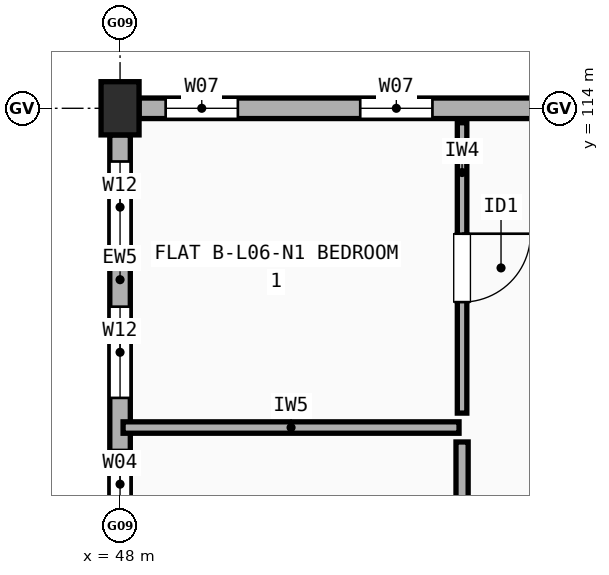
"""IFC4 building model, lengths in metres.
Left out: names, types, materials, properties, quantities, classifications, styles, units other than length and angle.
Written with IfcOpenShell. Run it as: python <this file> out.ifc"""

import sys

from ifc_helpers import new_model, si_unit, direction, frame, frame_2d, origin, origin_2d, place, context, subcontext, project, spatial, rectangle, extrude, element, fill, save


model = new_model("IFC4")
c1 = context("Model", 3, precision=1e-05, world=origin(), true_north=direction((0.0, 1.0)))
c2 = subcontext(c1, "Body", "Model", "MODEL_VIEW")
j1 = project(units=[si_unit("LENGTHUNIT", "METRE"), si_unit("PLANEANGLEUNIT", "RADIAN")], contexts=[c1])
p1 = place(None, origin())
s1 = spatial("IfcSite", under=j1, at=p1, CompositionType="ELEMENT")
p2 = place(p1, origin())
s2 = spatial("IfcBuilding", under=s1, at=p2, CompositionType="ELEMENT")
p3 = place(p2, frame((0.0, 0.0, 20.5)))
s3 = spatial("IfcBuildingStorey", under=s2, at=p3, CompositionType="ELEMENT", Elevation=20.5)
p4 = place(p3, frame((48.0, 114.0, 0.0), z_axis=(0.0, 0.0, 1.0), x_axis=(1.0, 0.0, 0.0)))
e1 = element("IfcColumn", 1, at=p4, inside=s3, PredefinedType="COLUMN", context=c2, shape_type="SweptSolid", body=[
    extrude(rectangle(XDim=0.5, YDim=0.7, at=origin_2d()), origin(), (0.0, 0.0, 1.0), 2.97),
])
p5 = place(p3, frame((53.725, 114.0, 0.0), z_axis=(0.0, 0.0, 1.0), x_axis=(-1.0, 0.0, 0.0)))
e2 = element("IfcWall", 2, at=p5, inside=s3, PredefinedType="STANDARD", context=c2, shape_type="SweptSolid", body=[
    extrude(rectangle(XDim=5.475, YDim=0.27, at=frame_2d((2.738, 0.0))), origin(), (0.0, 0.0, 1.0), 2.452),
])
p6 = place(p5, frame((1.615, 0.0, 0.9)))
e3 = element("IfcOpeningElement", 3, at=p6, cuts=e2, PredefinedType="OPENING", context=c2, shape_type="SweptSolid", body=[
    extrude(rectangle(XDim=0.95, YDim=1.35, at=frame_2d((0.475, 0.675))), frame((0.0, 0.145, 0.0), z_axis=(0.0, -1.0, 0.0), x_axis=(1.0, 0.0, 0.0)), (0.0, 0.0, 1.0), 0.29),
])
p7 = place(p5, frame((4.175, 0.0, 0.9)))
e4 = element("IfcOpeningElement", 4, at=p7, cuts=e2, PredefinedType="OPENING", context=c2, shape_type="SweptSolid", body=[
    extrude(rectangle(XDim=0.95, YDim=1.35, at=frame_2d((0.475, 0.675))), frame((0.0, 0.145, 0.0), z_axis=(0.0, -1.0, 0.0), x_axis=(1.0, 0.0, 0.0)), (0.0, 0.0, 1.0), 0.29),
])
p8 = place(p3, frame((48.0, 113.65, 0.0), z_axis=(0.0, 0.0, 1.0), x_axis=(0.0, -1.0, 0.0)))
e5 = element("IfcWall", 5, at=p8, inside=s3, PredefinedType="STANDARD", context=c2, shape_type="SweptSolid", body=[
    extrude(rectangle(XDim=5.3, YDim=0.27, at=frame_2d((2.65, 0.0))), origin(), (0.0, 0.0, 1.0), 2.452),
])
p9 = place(p8, frame((0.35, 0.0, 0.9)))
e6 = element("IfcOpeningElement", 6, at=p9, cuts=e5, PredefinedType="OPENING", context=c2, shape_type="SweptSolid", body=[
    extrude(rectangle(XDim=1.2, YDim=1.35, at=frame_2d((0.6, 0.675))), frame((0.0, 0.145, 0.0), z_axis=(0.0, -1.0, 0.0), x_axis=(1.0, 0.0, 0.0)), (0.0, 0.0, 1.0), 0.29),
])
p10 = place(p8, frame((2.26, 0.0, 0.9)))
e7 = element("IfcOpeningElement", 7, at=p10, cuts=e5, PredefinedType="OPENING", context=c2, shape_type="SweptSolid", body=[
    extrude(rectangle(XDim=1.2, YDim=1.35, at=frame_2d((0.6, 0.675))), frame((0.0, 0.145, 0.0), z_axis=(0.0, -1.0, 0.0), x_axis=(1.0, 0.0, 0.0)), (0.0, 0.0, 1.0), 0.29),
])
p11 = place(p8, frame((4.145, 0.0, 0.9)))
e8 = element("IfcOpeningElement", 8, at=p11, cuts=e5, PredefinedType="OPENING", context=c2, shape_type="SweptSolid", body=[
    extrude(rectangle(XDim=0.9, YDim=1.3, at=frame_2d((0.45, 0.65))), frame((0.0, 0.145, 0.0), z_axis=(0.0, -1.0, 0.0), x_axis=(1.0, 0.0, 0.0)), (0.0, 0.0, 1.0), 0.29),
])
p12 = place(p3, frame((52.5, 109.99, 0.0), z_axis=(0.0, 0.0, 1.0), x_axis=(0.0, 1.0, 0.0)))
e9 = element("IfcWall", 9, at=p12, inside=s3, PredefinedType="PARTITIONING", context=c2, shape_type="SweptSolid", body=[
    extrude(rectangle(XDim=3.82, YDim=0.125, at=frame_2d((1.91, 0.0))), origin(), (0.0, 0.0, 1.0), 2.97),
])
p13 = place(p12, frame((1.46, 0.0, 0.0)))
e10 = element("IfcOpeningElement", 10, at=p13, cuts=e9, PredefinedType="OPENING", context=c2, shape_type="SweptSolid", body=[
    extrude(rectangle(XDim=0.9, YDim=2.1, at=frame_2d((0.45, 1.05))), frame((0.0, 0.073, 0.0), z_axis=(0.0, -1.0, 0.0), x_axis=(1.0, 0.0, 0.0)), (0.0, 0.0, 1.0), 0.145),
])
p14 = place(p3, frame((52.5, 102.24, 0.0), z_axis=(0.0, 0.0, 1.0), x_axis=(0.0, 1.0, 0.0)))
e11 = element("IfcWall", 11, at=p14, inside=s3, PredefinedType="PLUMBINGWALL", context=c2, shape_type="SweptSolid", body=[
    extrude(rectangle(XDim=7.37, YDim=0.16, at=frame_2d((3.685, 0.0))), origin(), (0.0, 0.0, 1.0), 2.452),
])
p15 = place(p14, frame((3.245, 0.0, 0.0)))
e12 = element("IfcOpeningElement", 12, at=p15, cuts=e11, PredefinedType="OPENING", context=c2, shape_type="SweptSolid", body=[
    extrude(rectangle(XDim=0.88, YDim=2.1, at=frame_2d((0.44, 1.05))), frame((0.0, 0.09, 0.0), z_axis=(0.0, -1.0, 0.0), x_axis=(1.0, 0.0, 0.0)), (0.0, 0.0, 1.0), 0.18),
])
p16 = place(p3, frame((48.04, 109.8, 0.0), z_axis=(0.0, 0.0, 1.0), x_axis=(1.0, 0.0, 0.0)))
e13 = element("IfcWall", 13, at=p16, inside=s3, PredefinedType="PARTITIONING", context=c2, shape_type="SweptSolid", body=[
    extrude(rectangle(XDim=4.42, YDim=0.15, at=frame_2d((2.21, 0.0))), origin(), (0.0, 0.0, 1.0), 2.452),
])
p17 = place(p6, origin())
e14 = element("IfcWindow", 14, at=p17, inside=s3, PartitioningType="SINGLE_PANEL", PredefinedType="WINDOW", context=c2, shape_type="SweptSolid", body=[
    extrude(rectangle(XDim=0.95, YDim=1.35, at=frame_2d((0.475, 0.675))), frame((0.0, 0.03, 0.0), z_axis=(0.0, -1.0, 0.0), x_axis=(1.0, 0.0, 0.0)), (0.0, 0.0, 1.0), 0.06),
])
fill(e3, e14)
p18 = place(p7, origin())
e15 = element("IfcWindow", 15, at=p18, inside=s3, PartitioningType="SINGLE_PANEL", PredefinedType="WINDOW", context=c2, shape_type="SweptSolid", body=[
    extrude(rectangle(XDim=0.95, YDim=1.35, at=frame_2d((0.475, 0.675))), frame((0.0, 0.03, 0.0), z_axis=(0.0, -1.0, 0.0), x_axis=(1.0, 0.0, 0.0)), (0.0, 0.0, 1.0), 0.06),
])
fill(e4, e15)
p19 = place(p9, origin())
e16 = element("IfcWindow", 16, at=p19, inside=s3, PartitioningType="SINGLE_PANEL", PredefinedType="WINDOW", context=c2, shape_type="SweptSolid", body=[
    extrude(rectangle(XDim=1.2, YDim=1.35, at=frame_2d((0.6, 0.675))), frame((0.0, 0.03, 0.0), z_axis=(0.0, -1.0, 0.0), x_axis=(1.0, 0.0, 0.0)), (0.0, 0.0, 1.0), 0.06),
])
fill(e6, e16)
p20 = place(p10, origin())
e17 = element("IfcWindow", 17, at=p20, inside=s3, PartitioningType="SINGLE_PANEL", PredefinedType="WINDOW", context=c2, shape_type="SweptSolid", body=[
    extrude(rectangle(XDim=1.2, YDim=1.35, at=frame_2d((0.6, 0.675))), frame((0.0, 0.03, 0.0), z_axis=(0.0, -1.0, 0.0), x_axis=(1.0, 0.0, 0.0)), (0.0, 0.0, 1.0), 0.06),
])
fill(e7, e17)
p21 = place(p11, origin())
e18 = element("IfcWindow", 18, at=p21, inside=s3, PartitioningType="SINGLE_PANEL", PredefinedType="WINDOW", context=c2, shape_type="SweptSolid", body=[
    extrude(rectangle(XDim=0.9, YDim=1.3, at=frame_2d((0.45, 0.65))), frame((0.0, 0.03, 0.0), z_axis=(0.0, -1.0, 0.0), x_axis=(1.0, 0.0, 0.0)), (0.0, 0.0, 1.0), 0.06),
])
fill(e8, e18)
p22 = place(p13, origin())
e19 = element("IfcDoor", 19, at=p22, inside=s3, OperationType="SINGLE_SWING_RIGHT", PredefinedType="DOOR", context=c2, shape_type="SweptSolid", body=[
    extrude(rectangle(XDim=0.9, YDim=2.1, at=frame_2d((0.45, 1.05))), frame((0.0, 0.025, 0.0), z_axis=(0.0, -1.0, 0.0), x_axis=(1.0, 0.0, 0.0)), (0.0, 0.0, 1.0), 0.05),
])
fill(e10, e19)
save(model, sys.argv[1])
